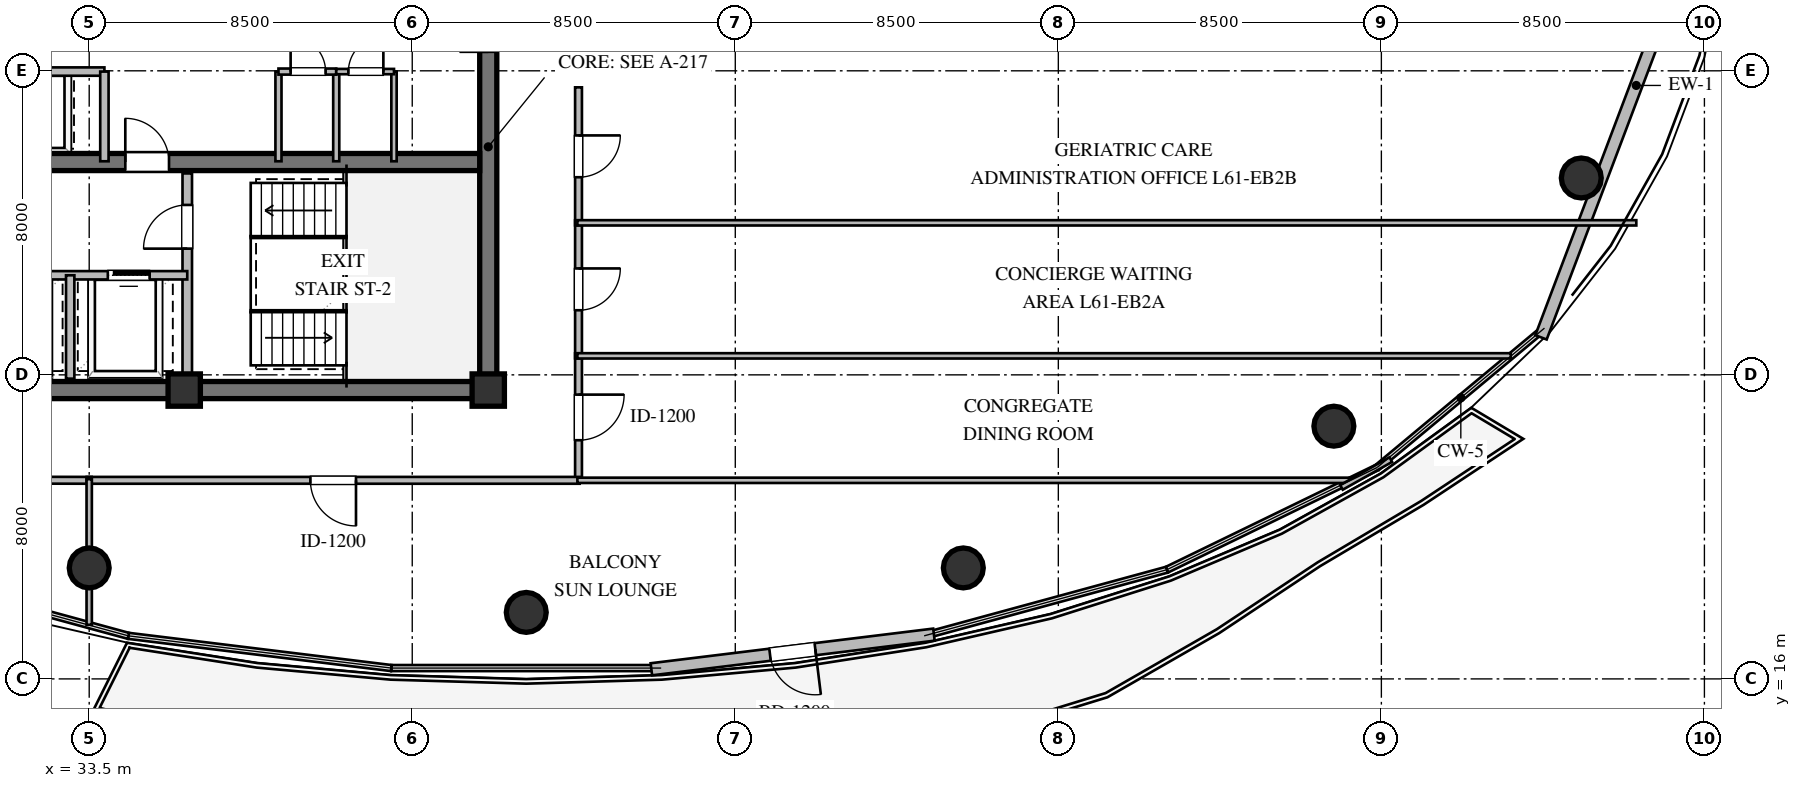
"""IFC4 building model, lengths in metres.
Left out: names, types, materials, properties, quantities, classifications, styles, units other than length and angle.
Written with IfcOpenShell. Run it as: python <this file> out.ifc"""

import sys

from ifc_helpers import new_model, si_unit, direction, frame, frame_2d, origin, origin_2d, place, context, subcontext, project, spatial, rectangle, circle, extrude, element, fill, save


model = new_model("IFC4")
c1 = context("Model", 3, precision=1e-05, world=origin(), true_north=direction((0.0, 1.0)))
c2 = subcontext(c1, "Body", "Model", "MODEL_VIEW")
j1 = project(units=[si_unit("LENGTHUNIT", "METRE"), si_unit("PLANEANGLEUNIT", "RADIAN")], contexts=[c1])
p1 = place(None, origin())
s1 = spatial("IfcSite", under=j1, at=p1, CompositionType="ELEMENT")
p2 = place(p1, origin())
s2 = spatial("IfcBuilding", under=s1, at=p2, CompositionType="ELEMENT")
p3 = place(p2, frame((0.0, 0.0, 231.6)))
s3 = spatial("IfcBuildingStorey", under=s2, at=p3, CompositionType="ELEMENT", Elevation=231.6)
p4 = place(p3, frame((21.775, 23.6, 0.0), z_axis=(0.0, 0.0, 1.0), x_axis=(1.0, 0.0, 0.0)))
e1 = element("IfcWall", 1, at=p4, inside=s3, PredefinedType="SHEAR", context=c2, shape_type="SweptSolid", body=[
    extrude(rectangle(XDim=22.45, YDim=0.45, at=frame_2d((11.225, 0.0))), origin(), (0.0, 0.0, 1.0), 3.36),
])
p5 = place(p3, frame((44.0, 23.825, 0.0), z_axis=(0.0, 0.0, 1.0), x_axis=(0.0, 1.0, 0.0)))
e2 = element("IfcWall", 2, at=p5, inside=s3, PredefinedType="SHEAR", context=c2, shape_type="SweptSolid", body=[
    extrude(rectangle(XDim=12.35, YDim=0.45, at=frame_2d((6.175, 0.0))), origin(), (0.0, 0.0, 1.0), 3.36),
])
p6 = place(p5, frame((8.675, 0.0, 0.0)))
e3 = element("IfcOpeningElement", 3, at=p6, cuts=e2, PredefinedType="OPENING", context=c2, shape_type="SweptSolid", body=[
    extrude(rectangle(XDim=1.5, YDim=2.15, at=frame_2d((0.75, 1.075))), frame((0.0, 0.235, 0.0), z_axis=(0.0, -1.0, 0.0), x_axis=(1.0, 0.0, 0.0)), (0.0, 0.0, 1.0), 0.47),
])
p7 = place(p3, frame((22.225, 29.6, 0.0), z_axis=(0.0, 0.0, 1.0), x_axis=(1.0, 0.0, 0.0)))
e4 = element("IfcWall", 4, at=p7, inside=s3, PredefinedType="SHEAR", context=c2, shape_type="SweptSolid", body=[
    extrude(rectangle(XDim=21.55, YDim=0.45, at=frame_2d((10.775, 0.0))), origin(), (0.0, 0.0, 1.0), 3.36),
])
p8 = place(p7, frame((12.225, 0.0, 0.0)))
e5 = element("IfcOpeningElement", 5, at=p8, cuts=e4, PredefinedType="OPENING", context=c2, shape_type="SweptSolid", body=[
    extrude(rectangle(XDim=1.15, YDim=2.1, at=frame_2d((0.575, 1.05))), frame((0.0, 0.235, 0.0), z_axis=(0.0, -1.0, 0.0), x_axis=(1.0, 0.0, 0.0)), (0.0, 0.0, 1.0), 0.47),
])
for number, where, z_axis, x_axis in (
    (6, (36.0, 23.6, 0.0), (0.0, 0.0, 1.0), (1.0, 0.0, 0.0)),
    (7, (44.0, 23.6, 0.0), (0.0, 0.0, 1.0), (1.0, 0.0, 0.0)),
):
    element("IfcColumn", number, at=place(p3, frame(where, z_axis=z_axis, x_axis=x_axis)), inside=s3, PredefinedType="COLUMN", context=c2, shape_type="SweptSolid", body=[
        extrude(rectangle(XDim=0.85, YDim=0.85, at=origin_2d()), origin(), (0.0, 0.0, 1.0), 3.6),
    ])
for number, where, z_axis, x_axis in (
    (8, (33.5, 18.92, 0.0), (0.0, 0.0, 1.0), (1.0, 0.0, 0.0)),
    (9, (45.0, 17.75, 0.0), (0.0, 0.0, 1.0), (1.0, 0.0, 0.0)),
    (10, (56.5, 18.92, 0.0), (0.0, 0.0, 1.0), (1.0, 0.0, 0.0)),
    (11, (66.25, 22.65, 0.0), (0.0, 0.0, 1.0), (1.0, 0.0, 0.0)),
    (12, (72.76, 29.18, 0.0), (0.0, 0.0, 1.0), (1.0, 0.0, 0.0)),
):
    element("IfcColumn", number, at=place(p3, frame(where, z_axis=z_axis, x_axis=x_axis)), inside=s3, PredefinedType="COLUMN", context=c2, shape_type="SweptSolid", body=[
        extrude(circle(Radius=0.525, at=origin_2d()), origin(), (0.0, 0.0, 1.0), 3.6),
    ])
p9 = place(p3, frame((76.712, 38.243, 0.0), z_axis=(0.0, 0.0, 1.0), x_axis=(-0.353659523244, -0.935374225441, 0.0)))
e13 = element("IfcWall", 13, at=p9, inside=s3, PredefinedType="STANDARD", context=c2, shape_type="SweptSolid", body=[
    extrude(rectangle(XDim=14.172, YDim=0.32, at=frame_2d((7.086, 0.0))), origin(), (0.0, 0.0, 1.0), 3.36),
])
p10 = place(p3, frame((55.727, 17.165, 0.0), z_axis=(0.0, 0.0, 1.0), x_axis=(-0.992559081031, -0.121763995755, 0.0)))
e14 = element("IfcWall", 14, at=p10, inside=s3, PredefinedType="STANDARD", context=c2, shape_type="SweptSolid", body=[
    extrude(rectangle(XDim=7.491, YDim=0.32, at=frame_2d((3.745, 0.0))), origin(), (0.0, 0.0, 1.0), 3.36),
])
p11 = place(p10, frame((3.145, 0.0, 0.0)))
e15 = element("IfcOpeningElement", 15, at=p11, cuts=e14, PredefinedType="OPENING", context=c2, shape_type="SweptSolid", body=[
    extrude(rectangle(XDim=1.2, YDim=2.15, at=frame_2d((0.6, 1.075))), frame((0.0, 0.17, 0.0), z_axis=(0.0, -1.0, 0.0), x_axis=(1.0, 0.0, 0.0)), (0.0, 0.0, 1.0), 0.34),
])
p12 = place(p3, frame((36.08, 23.9, 0.0), z_axis=(0.0, 0.0, 1.0), x_axis=(0.0, 1.0, 0.0)))
e16 = element("IfcWall", 16, at=p12, inside=s3, PredefinedType="SOLIDWALL", context=c2, shape_type="SweptSolid", body=[
    extrude(rectangle(XDim=5.4, YDim=0.25, at=frame_2d((2.7, 0.0))), origin(), (0.0, 0.0, 1.0), 3.36),
])
p13 = place(p12, frame((3.421, 0.0, 0.0)))
e17 = element("IfcOpeningElement", 17, at=p13, cuts=e16, PredefinedType="OPENING", context=c2, shape_type="SweptSolid", body=[
    extrude(rectangle(XDim=1.15, YDim=2.1, at=frame_2d((0.575, 1.05))), frame((0.0, 0.135, 0.0), z_axis=(0.0, -1.0, 0.0), x_axis=(1.0, 0.0, 0.0)), (0.0, 0.0, 1.0), 0.27),
])
p14 = place(p3, frame((29.92, 26.62, 0.0), z_axis=(0.0, 0.0, 1.0), x_axis=(1.0, 0.0, 0.0)))
e18 = element("IfcWall", 18, at=p14, inside=s3, PredefinedType="SOLIDWALL", context=c2, shape_type="SweptSolid", body=[
    extrude(rectangle(XDim=6.16, YDim=0.22, at=frame_2d((3.08, 0.0))), origin(), (0.0, 0.0, 1.0), 3.36),
])
p15 = place(p14, frame((0.99, 0.0, 0.0)))
e19 = element("IfcOpeningElement", 19, at=p15, cuts=e18, PredefinedType="OPENING", context=c2, shape_type="SweptSolid", body=[
    extrude(rectangle(XDim=1.1, YDim=2.1, at=frame_2d((0.55, 1.05))), frame((0.0, 0.12, 0.0), z_axis=(0.0, -1.0, 0.0), x_axis=(1.0, 0.0, 0.0)), (0.0, 0.0, 1.0), 0.24),
])
p16 = place(p14, frame((4.07, 0.0, 0.0)))
e20 = element("IfcOpeningElement", 20, at=p16, cuts=e18, PredefinedType="OPENING", context=c2, shape_type="SweptSolid", body=[
    extrude(rectangle(XDim=1.1, YDim=2.1, at=frame_2d((0.55, 1.05))), frame((0.0, 0.12, 0.0), z_axis=(0.0, -1.0, 0.0), x_axis=(1.0, 0.0, 0.0)), (0.0, 0.0, 1.0), 0.24),
])
p17 = place(p3, frame((33.0, 23.9, 0.0), z_axis=(0.0, 0.0, 1.0), x_axis=(0.0, 1.0, 0.0)))
e21 = element("IfcWall", 21, at=p17, inside=s3, PredefinedType="SOLIDWALL", context=c2, shape_type="SweptSolid", body=[
    extrude(rectangle(XDim=2.72, YDim=0.22, at=frame_2d((1.36, 0.0))), origin(), (0.0, 0.0, 1.0), 3.36),
])
p18 = place(p3, frame((26.1, 31.98, 0.0), z_axis=(0.0, 0.0, 1.0), x_axis=(1.0, 0.0, 0.0)))
e22 = element("IfcWall", 22, at=p18, inside=s3, PredefinedType="SOLIDWALL", context=c2, shape_type="SweptSolid", body=[
    extrude(rectangle(XDim=7.8, YDim=0.22, at=frame_2d((3.9, 0.0))), origin(), (0.0, 0.0, 1.0), 3.36),
])
p19 = place(p18, frame((1.4, 0.0, 0.0)))
e23 = element("IfcOpeningElement", 23, at=p19, cuts=e22, PredefinedType="OPENING", context=c2, shape_type="SweptSolid", body=[
    extrude(rectangle(XDim=1.1, YDim=2.1, at=frame_2d((0.55, 1.05))), frame((0.0, 0.12, 0.0), z_axis=(0.0, -1.0, 0.0), x_axis=(1.0, 0.0, 0.0)), (0.0, 0.0, 1.0), 0.24),
])
p20 = place(p18, frame((5.066, 0.0, 0.0)))
e24 = element("IfcOpeningElement", 24, at=p20, cuts=e22, PredefinedType="OPENING", context=c2, shape_type="SweptSolid", body=[
    extrude(rectangle(XDim=1.1, YDim=2.1, at=frame_2d((0.55, 1.05))), frame((0.0, 0.12, 0.0), z_axis=(0.0, -1.0, 0.0), x_axis=(1.0, 0.0, 0.0)), (0.0, 0.0, 1.0), 0.24),
])
p21 = place(p3, frame((33.9, 29.62, 0.0), z_axis=(0.0, 0.0, 1.0), x_axis=(0.0, 1.0, 0.0)))
e25 = element("IfcWall", 25, at=p21, inside=s3, PredefinedType="SOLIDWALL", context=c2, shape_type="SweptSolid", body=[
    extrude(rectangle(XDim=2.36, YDim=0.22, at=frame_2d((1.18, 0.0))), origin(), (0.0, 0.0, 1.0), 3.36),
])
for number, where, z_axis, x_axis in (
    (26, (38.48, 29.62, 0.0), (0.0, 0.0, 1.0), (0.0, 1.0, 0.0)),
    (27, (40.0, 29.62, 0.0), (0.0, 0.0, 1.0), (0.0, 1.0, 0.0)),
):
    element("IfcWall", number, at=place(p3, frame(where, z_axis=z_axis, x_axis=x_axis)), inside=s3, PredefinedType="PLUMBINGWALL", context=c2, shape_type="SweptSolid", body=[
        extrude(rectangle(XDim=2.36, YDim=0.16, at=frame_2d((1.18, 0.0))), origin(), (0.0, 0.0, 1.0), 3.36),
    ])
p22 = place(p3, frame((41.52, 29.62, 0.0), z_axis=(0.0, 0.0, 1.0), x_axis=(0.0, 1.0, 0.0)))
e28 = element("IfcWall", 28, at=p22, inside=s3, PredefinedType="PARTITIONING", context=c2, shape_type="SweptSolid", body=[
    extrude(rectangle(XDim=2.36, YDim=0.14, at=frame_2d((1.18, 0.0))), origin(), (0.0, 0.0, 1.0), 3.36),
])
p23 = place(p3, frame((38.48, 31.98, 0.0), z_axis=(0.0, 0.0, 1.0), x_axis=(1.0, 0.0, 0.0)))
e29 = element("IfcWall", 29, at=p23, inside=s3, PredefinedType="PLUMBINGWALL", context=c2, shape_type="SweptSolid", body=[
    extrude(rectangle(XDim=1.52, YDim=0.16, at=frame_2d((0.76, 0.0))), origin(), (0.0, 0.0, 1.0), 3.36),
])
p24 = place(p23, frame((0.32, 0.0, 0.0)))
e30 = element("IfcOpeningElement", 30, at=p24, cuts=e29, PredefinedType="OPENING", context=c2, shape_type="SweptSolid", body=[
    extrude(rectangle(XDim=0.92, YDim=2.1, at=frame_2d((0.46, 1.05))), frame((0.0, 0.09, 0.0), z_axis=(0.0, -1.0, 0.0), x_axis=(1.0, 0.0, 0.0)), (0.0, 0.0, 1.0), 0.18),
])
p25 = place(p3, frame((40.0, 31.98, 0.0), z_axis=(0.0, 0.0, 1.0), x_axis=(1.0, 0.0, 0.0)))
e31 = element("IfcWall", 31, at=p25, inside=s3, PredefinedType="PARTITIONING", context=c2, shape_type="SweptSolid", body=[
    extrude(rectangle(XDim=1.52, YDim=0.14, at=frame_2d((0.76, 0.0))), origin(), (0.0, 0.0, 1.0), 3.36),
])
p26 = place(p25, frame((0.32, 0.0, 0.0)))
e32 = element("IfcOpeningElement", 32, at=p26, cuts=e31, PredefinedType="OPENING", context=c2, shape_type="SweptSolid", body=[
    extrude(rectangle(XDim=0.92, YDim=2.1, at=frame_2d((0.46, 1.05))), frame((0.0, 0.08, 0.0), z_axis=(0.0, -1.0, 0.0), x_axis=(1.0, 0.0, 0.0)), (0.0, 0.0, 1.0), 0.16),
])
p27 = place(p3, frame((46.375, 24.565, 0.0), z_axis=(0.0, 0.0, 1.0), x_axis=(0.0, -1.0, 0.0)))
e33 = element("IfcWall", 33, at=p27, inside=s3, PredefinedType="PARTITIONING", context=c2, shape_type="SweptSolid", body=[
    extrude(rectangle(XDim=3.37, YDim=0.18, at=frame_2d((1.685, 0.0))), origin(), (0.0, 0.0, 1.0), 3.36),
])
p28 = place(p27, frame((1.085, 0.0, 0.0)))
e34 = element("IfcOpeningElement", 34, at=p28, cuts=e33, PredefinedType="OPENING", context=c2, shape_type="SweptSolid", body=[
    extrude(rectangle(XDim=1.2, YDim=2.15, at=frame_2d((0.6, 1.075))), frame((0.0, 0.1, 0.0), z_axis=(0.0, -1.0, 0.0), x_axis=(1.0, 0.0, 0.0)), (0.0, 0.0, 1.0), 0.2),
])
p29 = place(p3, frame((46.375, 28.065, 0.0), z_axis=(0.0, 0.0, 1.0), x_axis=(0.0, -1.0, 0.0)))
e35 = element("IfcWall", 35, at=p29, inside=s3, PredefinedType="PARTITIONING", context=c2, shape_type="SweptSolid", body=[
    extrude(rectangle(XDim=3.63, YDim=0.18, at=frame_2d((1.815, 0.0))), origin(), (0.0, 0.0, 1.0), 3.36),
])
p30 = place(p29, frame((1.265, 0.0, 0.0)))
e36 = element("IfcOpeningElement", 36, at=p30, cuts=e35, PredefinedType="OPENING", context=c2, shape_type="SweptSolid", body=[
    extrude(rectangle(XDim=1.1, YDim=2.1, at=frame_2d((0.55, 1.05))), frame((0.0, 0.1, 0.0), z_axis=(0.0, -1.0, 0.0), x_axis=(1.0, 0.0, 0.0)), (0.0, 0.0, 1.0), 0.2),
])
p31 = place(p3, frame((46.375, 31.565, 0.0), z_axis=(0.0, 0.0, 1.0), x_axis=(0.0, -1.0, 0.0)))
e37 = element("IfcWall", 37, at=p31, inside=s3, PredefinedType="PARTITIONING", context=c2, shape_type="SweptSolid", body=[
    extrude(rectangle(XDim=3.63, YDim=0.18, at=frame_2d((1.815, 0.0))), origin(), (0.0, 0.0, 1.0), 3.36),
])
p32 = place(p31, frame((1.265, 0.0, 0.0)))
e38 = element("IfcOpeningElement", 38, at=p32, cuts=e37, PredefinedType="OPENING", context=c2, shape_type="SweptSolid", body=[
    extrude(rectangle(XDim=1.1, YDim=2.1, at=frame_2d((0.55, 1.05))), frame((0.0, 0.1, 0.0), z_axis=(0.0, -1.0, 0.0), x_axis=(1.0, 0.0, 0.0)), (0.0, 0.0, 1.0), 0.2),
])
p33 = place(p3, frame((33.565, 21.225, 0.0), z_axis=(0.0, 0.0, 1.0), x_axis=(-0.999998619279, 0.001661758222, 0.0)))
e39 = element("IfcWall", 39, at=p33, inside=s3, PredefinedType="PARTITIONING", context=c2, shape_type="SweptSolid", body=[
    extrude(rectangle(XDim=10.284, YDim=0.18, at=frame_2d((5.142, 0.0))), origin(), (0.0, 0.0, 1.0), 2.89),
])
p34 = place(p33, frame((6.229, 0.0, 0.0)))
e40 = element("IfcOpeningElement", 40, at=p34, cuts=e39, PredefinedType="OPENING", context=c2, shape_type="SweptSolid", body=[
    extrude(rectangle(XDim=1.1, YDim=2.1, at=frame_2d((0.55, 1.05))), frame((0.0, 0.1, 0.0), z_axis=(0.0, -1.0, 0.0), x_axis=(1.0, 0.0, 0.0)), (0.0, 0.0, 1.0), 0.2),
])
p35 = place(p3, frame((46.405, 21.225, 0.0), z_axis=(0.0, 0.0, 1.0), x_axis=(-1.0, 0.0, 0.0)))
e41 = element("IfcWall", 41, at=p35, inside=s3, PredefinedType="PARTITIONING", context=c2, shape_type="SweptSolid", body=[
    extrude(rectangle(XDim=12.97, YDim=0.18, at=frame_2d((6.485, 0.0))), origin(), (0.0, 0.0, 1.0), 2.996),
])
p36 = place(p35, frame((5.885, 0.0, 0.0)))
e42 = element("IfcOpeningElement", 42, at=p36, cuts=e41, PredefinedType="OPENING", context=c2, shape_type="SweptSolid", body=[
    extrude(rectangle(XDim=1.2, YDim=2.15, at=frame_2d((0.6, 1.075))), frame((0.0, 0.1, 0.0), z_axis=(0.0, -1.0, 0.0), x_axis=(1.0, 0.0, 0.0)), (0.0, 0.0, 1.0), 0.2),
])
p37 = place(p3, frame((46.345, 24.5, 0.0), z_axis=(0.0, 0.0, 1.0), x_axis=(1.0, 0.0, 0.0)))
e43 = element("IfcWall", 43, at=p37, inside=s3, PredefinedType="PARTITIONING", context=c2, shape_type="SweptSolid", body=[
    extrude(rectangle(XDim=24.561, YDim=0.14, at=frame_2d((12.28, 0.0))), origin(), (0.0, 0.0, 1.0), 2.89),
])
p38 = place(p3, frame((66.684, 21.225, 0.0), z_axis=(0.0, 0.0, 1.0), x_axis=(-1.0, 0.0, 0.0)))
e44 = element("IfcWall", 44, at=p38, inside=s3, PredefinedType="PARTITIONING", context=c2, shape_type="SweptSolid", body=[
    extrude(rectangle(XDim=20.339, YDim=0.14, at=frame_2d((10.169, 0.0))), origin(), (0.0, 0.0, 1.0), 2.996),
])
p39 = place(p3, frame((67.748, 21.77, 0.0), z_axis=(0.0, 0.0, 1.0), x_axis=(-0.871352238731, -0.490658003153, 0.0)))
e45 = element("IfcWall", 45, at=p39, inside=s3, PredefinedType="PARTITIONING", context=c2, shape_type="SweptSolid", body=[
    extrude(rectangle(XDim=1.49, YDim=0.14, at=frame_2d((0.745, 0.0))), origin(), (0.0, 0.0, 1.0), 3.36),
])
p40 = place(p3, frame((46.345, 28.0, 0.0), z_axis=(0.0, 0.0, 1.0), x_axis=(1.0, 0.0, 0.0)))
e46 = element("IfcWall", 46, at=p40, inside=s3, PredefinedType="PARTITIONING", context=c2, shape_type="SweptSolid", body=[
    extrude(rectangle(XDim=27.863, YDim=0.14, at=frame_2d((13.932, 0.0))), origin(), (0.0, 0.0, 1.0), 2.89),
])
p41 = place(p3, frame((33.5, 21.255, 0.0), z_axis=(0.0, 0.0, 1.0), x_axis=(0.0, -1.0, 0.0)))
e47 = element("IfcWall", 47, at=p41, inside=s3, PredefinedType="PARTITIONING", context=c2, shape_type="SweptSolid", body=[
    extrude(rectangle(XDim=3.831, YDim=0.14, at=frame_2d((1.916, 0.0))), origin(), (0.0, 0.0, 1.0), 3.36),
])
p42 = place(p11, origin())
e48 = element("IfcDoor", 48, at=p42, inside=s3, OperationType="SINGLE_SWING_LEFT", PredefinedType="DOOR", context=c2, shape_type="SweptSolid", body=[
    extrude(rectangle(XDim=1.2, YDim=2.15, at=frame_2d((0.6, 1.075))), frame((0.0, 0.025, 0.0), z_axis=(0.0, -1.0, 0.0), x_axis=(1.0, 0.0, 0.0)), (0.0, 0.0, 1.0), 0.05),
])
fill(e15, e48)
p43 = place(p13, origin())
e49 = element("IfcDoor", 49, at=p43, inside=s3, OperationType="SINGLE_SWING_LEFT", PredefinedType="DOOR", context=c2, shape_type="SweptSolid", body=[
    extrude(rectangle(XDim=1.15, YDim=2.1, at=frame_2d((0.575, 1.05))), frame((0.0, 0.025, 0.0), z_axis=(0.0, -1.0, 0.0), x_axis=(1.0, 0.0, 0.0)), (0.0, 0.0, 1.0), 0.05),
])
fill(e17, e49)
p44 = place(p16, origin())
e50 = element("IfcDoor", 50, at=p44, inside=s3, OperationType="SLIDING_TO_RIGHT", PredefinedType="DOOR", context=c2, shape_type="SweptSolid", body=[
    extrude(rectangle(XDim=1.1, YDim=2.1, at=frame_2d((0.55, 1.05))), frame((0.0, 0.025, 0.0), z_axis=(0.0, -1.0, 0.0), x_axis=(1.0, 0.0, 0.0)), (0.0, 0.0, 1.0), 0.05),
])
fill(e20, e50)
p45 = place(p8, origin())
e51 = element("IfcDoor", 51, at=p45, inside=s3, OperationType="SINGLE_SWING_LEFT", PredefinedType="DOOR", context=c2, shape_type="SweptSolid", body=[
    extrude(rectangle(XDim=1.15, YDim=2.1, at=frame_2d((0.575, 1.05))), frame((0.0, 0.025, 0.0), z_axis=(0.0, -1.0, 0.0), x_axis=(1.0, 0.0, 0.0)), (0.0, 0.0, 1.0), 0.05),
])
fill(e5, e51)
p46 = place(p24, origin())
e52 = element("IfcDoor", 52, at=p46, inside=s3, OperationType="SINGLE_SWING_LEFT", PredefinedType="DOOR", context=c2, shape_type="SweptSolid", body=[
    extrude(rectangle(XDim=0.92, YDim=2.1, at=frame_2d((0.46, 1.05))), frame((0.0, 0.025, 0.0), z_axis=(0.0, -1.0, 0.0), x_axis=(1.0, 0.0, 0.0)), (0.0, 0.0, 1.0), 0.05),
])
fill(e30, e52)
p47 = place(p26, origin())
e53 = element("IfcDoor", 53, at=p47, inside=s3, OperationType="SINGLE_SWING_RIGHT", PredefinedType="DOOR", context=c2, shape_type="SweptSolid", body=[
    extrude(rectangle(XDim=0.92, YDim=2.1, at=frame_2d((0.46, 1.05))), frame((0.0, 0.025, 0.0), z_axis=(0.0, -1.0, 0.0), x_axis=(1.0, 0.0, 0.0)), (0.0, 0.0, 1.0), 0.05),
])
fill(e32, e53)
p48 = place(p28, origin())
e54 = element("IfcDoor", 54, at=p48, inside=s3, OperationType="SINGLE_SWING_LEFT", PredefinedType="DOOR", context=c2, shape_type="SweptSolid", body=[
    extrude(rectangle(XDim=1.2, YDim=2.15, at=frame_2d((0.6, 1.075))), frame((0.0, 0.025, 0.0), z_axis=(0.0, -1.0, 0.0), x_axis=(1.0, 0.0, 0.0)), (0.0, 0.0, 1.0), 0.05),
])
fill(e34, e54)
p49 = place(p30, origin())
e55 = element("IfcDoor", 55, at=p49, inside=s3, OperationType="SINGLE_SWING_LEFT", PredefinedType="DOOR", context=c2, shape_type="SweptSolid", body=[
    extrude(rectangle(XDim=1.1, YDim=2.1, at=frame_2d((0.55, 1.05))), frame((0.0, 0.025, 0.0), z_axis=(0.0, -1.0, 0.0), x_axis=(1.0, 0.0, 0.0)), (0.0, 0.0, 1.0), 0.05),
])
fill(e36, e55)
p50 = place(p32, origin())
e56 = element("IfcDoor", 56, at=p50, inside=s3, OperationType="SINGLE_SWING_LEFT", PredefinedType="DOOR", context=c2, shape_type="SweptSolid", body=[
    extrude(rectangle(XDim=1.1, YDim=2.1, at=frame_2d((0.55, 1.05))), frame((0.0, 0.025, 0.0), z_axis=(0.0, -1.0, 0.0), x_axis=(1.0, 0.0, 0.0)), (0.0, 0.0, 1.0), 0.05),
])
fill(e38, e56)
p51 = place(p36, origin())
e57 = element("IfcDoor", 57, at=p51, inside=s3, OperationType="SINGLE_SWING_LEFT", PredefinedType="DOOR", context=c2, shape_type="SweptSolid", body=[
    extrude(rectangle(XDim=1.2, YDim=2.15, at=frame_2d((0.6, 1.075))), frame((0.0, 0.025, 0.0), z_axis=(0.0, -1.0, 0.0), x_axis=(1.0, 0.0, 0.0)), (0.0, 0.0, 1.0), 0.05),
])
fill(e42, e57)
save(model, sys.argv[1])
